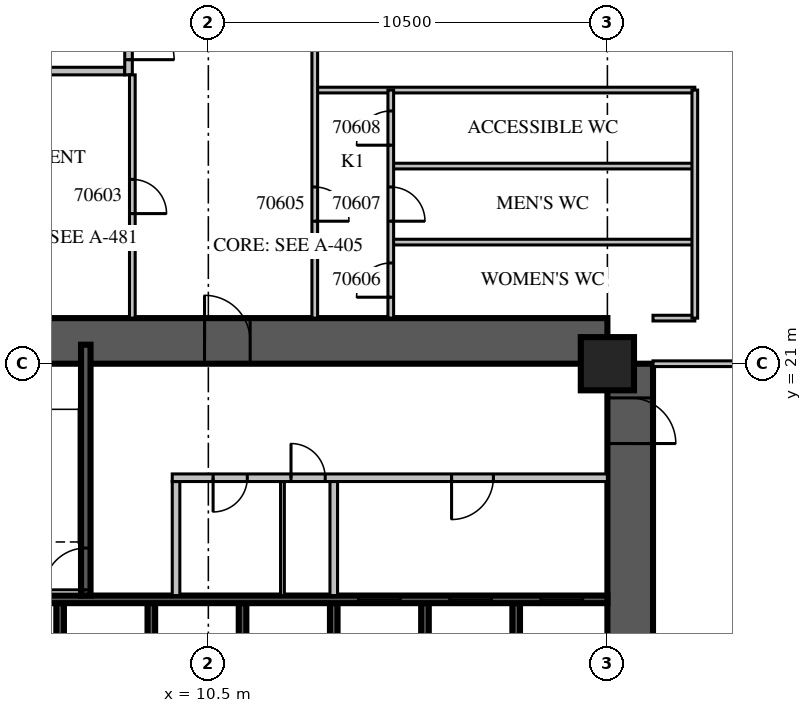
"""IFC4 building model, lengths in metres.
Left out: names, types, materials, properties, quantities, classifications, styles, units other than length and angle.
Written with IfcOpenShell. Run it as: python <this file> out.ifc"""

import sys

from ifc_helpers import new_model, si_unit, direction, frame, frame_2d, origin, origin_2d, place, context, subcontext, project, spatial, rectangle, extrude, source, transform, mapped, element, fill, save


model = new_model("IFC4")
c1 = context("Model", 3, precision=1e-05, world=origin(), true_north=direction((0.0, 1.0)))
c2 = subcontext(c1, "Body", "Model", "MODEL_VIEW")
j1 = project(units=[si_unit("LENGTHUNIT", "METRE"), si_unit("PLANEANGLEUNIT", "RADIAN")], contexts=[c1])
p1 = place(None, origin())
s1 = spatial("IfcSite", under=j1, at=p1, CompositionType="ELEMENT")
p2 = place(p1, origin())
s2 = spatial("IfcBuilding", under=s1, at=p2, CompositionType="ELEMENT")
p3 = place(p2, frame((0.0, 0.0, 18.3)))
s3 = spatial("IfcBuildingStorey", under=s2, at=p3, CompositionType="ELEMENT", Elevation=18.3)
m1 = source(origin(), c2, "Body", "SweptSolid", [
    extrude(rectangle(XDim=1.4, YDim=1.4, at=origin_2d()), origin(), (0.0, 0.0, 1.0), 5.4),
])
p4 = place(p3, frame((21.0, 21.0, 0.0), z_axis=(0.0, 0.0, 1.0), x_axis=(1.0, 0.0, 0.0)))
e1 = element("IfcColumn", 1, at=p4, inside=s3, PredefinedType="COLUMN", context=c2, shape_type="MappedRepresentation", body=[
    mapped(m1, transform((0.0, 0.0, 0.0), scale=1.0)),
])
m2 = source(origin(), c2, "Body", "SweptSolid", [
    extrude(rectangle(XDim=16.8, YDim=1.2, at=frame_2d((8.4, 0.0))), origin(), (0.0, 0.0, 1.0), 5.4),
])
p5 = place(p3, frame((21.6, 4.2, 0.0), z_axis=(0.0, 0.0, 1.0), x_axis=(0.0, 1.0, 0.0)))
e2 = element("IfcWall", 2, at=p5, inside=s3, PredefinedType="SHEAR", context=c2, shape_type="MappedRepresentation", body=[
    mapped(m2, transform((0.0, 0.0, 0.0), scale=1.0)),
])
m3 = source(origin(), c2, "Body", "SweptSolid", [
    extrude(rectangle(XDim=2.2, YDim=2.1, at=frame_2d((1.1, 1.05))), frame((0.0, 0.61, 0.0), z_axis=(0.0, -1.0, 0.0), x_axis=(1.0, 0.0, 0.0)), (0.0, 0.0, 1.0), 1.22),
])
p6 = place(p5, frame((4.2, 0.0, 0.0)))
e3 = element("IfcOpeningElement", 3, at=p6, cuts=e2, PredefinedType="OPENING", context=c2, shape_type="MappedRepresentation", body=[
    mapped(m3, transform((0.0, 0.0, 0.0), scale=1.0)),
])
m4 = source(origin(), c2, "Body", "SweptSolid", [
    extrude(rectangle(XDim=1.2, YDim=2.1, at=frame_2d((0.6, 1.05))), frame((0.0, 0.61, 0.0), z_axis=(0.0, -1.0, 0.0), x_axis=(1.0, 0.0, 0.0)), (0.0, 0.0, 1.0), 1.22),
])
p7 = place(p5, frame((14.7, 0.0, 0.0)))
e4 = element("IfcOpeningElement", 4, at=p7, cuts=e2, PredefinedType="OPENING", context=c2, shape_type="MappedRepresentation", body=[
    mapped(m4, transform((0.0, 0.0, 0.0), scale=1.0)),
])
p8 = place(p3, frame((4.2, 21.6, 0.0), z_axis=(0.0, 0.0, 1.0), x_axis=(1.0, 0.0, 0.0)))
e5 = element("IfcWall", 5, at=p8, inside=s3, PredefinedType="SHEAR", context=c2, shape_type="MappedRepresentation", body=[
    mapped(m2, transform((0.0, 0.0, 0.0), scale=1.0)),
])
p9 = place(p8, frame((6.2, 0.0, 0.0)))
e6 = element("IfcOpeningElement", 6, at=p9, cuts=e5, PredefinedType="OPENING", context=c2, shape_type="MappedRepresentation", body=[
    mapped(m4, transform((0.0, 0.0, 0.0), scale=1.0)),
])
m5 = source(origin(), c2, "Body", "SweptSolid", [
    extrude(rectangle(XDim=3.0, YDim=0.2, at=frame_2d((1.5, 0.0))), origin(), (0.0, 0.0, 1.0), 5.4),
])
for number, where, z_axis, x_axis in (
    (7, (6.6, 11.7, 0.0), (0.0, 0.0, 1.0), (0.0, 1.0, 0.0)),
    (8, (9.0, 11.7, 0.0), (0.0, 0.0, 1.0), (0.0, 1.0, 0.0)),
    (9, (11.4, 11.7, 0.0), (0.0, 0.0, 1.0), (0.0, 1.0, 0.0)),
    (10, (13.8, 11.7, 0.0), (0.0, 0.0, 1.0), (0.0, 1.0, 0.0)),
    (11, (16.2, 11.7, 0.0), (0.0, 0.0, 1.0), (0.0, 1.0, 0.0)),
    (12, (18.6, 11.7, 0.0), (0.0, 0.0, 1.0), (0.0, 1.0, 0.0)),
):
    element("IfcWall", number, at=place(p3, frame(where, z_axis=z_axis, x_axis=x_axis)), inside=s3, PredefinedType="SOLIDWALL", context=c2, shape_type="MappedRepresentation", body=[
        mapped(m5, transform((0.0, 0.0, 0.0), scale=1.0)),
    ])
m6 = source(origin(), c2, "Body", "SweptSolid", [
    extrude(rectangle(XDim=16.8, YDim=0.2, at=frame_2d((8.4, 0.0))), origin(), (0.0, 0.0, 1.0), 5.4),
])
p10 = place(p3, frame((4.2, 14.8, 0.0), z_axis=(0.0, 0.0, 1.0), x_axis=(1.0, 0.0, 0.0)))
e13 = element("IfcWall", 13, at=p10, inside=s3, PredefinedType="SOLIDWALL", context=c2, shape_type="MappedRepresentation", body=[
    mapped(m6, transform((0.0, 0.0, 0.0), scale=1.0)),
])
m7 = source(origin(), c2, "Body", "SweptSolid", [
    extrude(rectangle(XDim=1.1, YDim=2.1, at=frame_2d((0.55, 1.05))), frame((0.0, 0.11, 0.0), z_axis=(0.0, -1.0, 0.0), x_axis=(1.0, 0.0, 0.0)), (0.0, 0.0, 1.0), 0.22),
])
p11 = place(p10, frame((10.25, 0.0, 0.0)))
e14 = element("IfcOpeningElement", 14, at=p11, cuts=e13, PredefinedType="OPENING", context=c2, shape_type="MappedRepresentation", body=[
    mapped(m7, transform((0.0, 0.0, 0.0), scale=1.0)),
])
p12 = place(p10, frame((12.65, 0.0, 0.0)))
e15 = element("IfcOpeningElement", 15, at=p12, cuts=e13, PredefinedType="OPENING", context=c2, shape_type="MappedRepresentation", body=[
    mapped(m7, transform((0.0, 0.0, 0.0), scale=1.0)),
])
p13 = place(p10, frame((15.05, 0.0, 0.0)))
e16 = element("IfcOpeningElement", 16, at=p13, cuts=e13, PredefinedType="OPENING", context=c2, shape_type="MappedRepresentation", body=[
    mapped(m7, transform((0.0, 0.0, 0.0), scale=1.0)),
])
m8 = source(origin(), c2, "Body", "SweptSolid", [
    extrude(rectangle(XDim=6.6, YDim=0.25, at=frame_2d((3.3, 0.0))), origin(), (0.0, 0.0, 1.0), 4.8),
])
p14 = place(p3, frame((7.275, 14.9, 0.0), z_axis=(0.0, 0.0, 1.0), x_axis=(0.0, 1.0, 0.0)))
e17 = element("IfcWall", 17, at=p14, inside=s3, PredefinedType="SOLIDWALL", context=c2, shape_type="MappedRepresentation", body=[
    mapped(m8, transform((0.0, 0.0, 0.0), scale=1.0)),
])
m9 = source(origin(), c2, "Body", "SweptSolid", [
    extrude(rectangle(XDim=1.1, YDim=2.1, at=frame_2d((0.55, 1.05))), frame((0.0, 0.135, 0.0), z_axis=(0.0, -1.0, 0.0), x_axis=(1.0, 0.0, 0.0)), (0.0, 0.0, 1.0), 0.27),
])
p15 = place(p14, frame((0.15, 0.0, 0.0)))
e18 = element("IfcOpeningElement", 18, at=p15, cuts=e17, PredefinedType="OPENING", context=c2, shape_type="MappedRepresentation", body=[
    mapped(m9, transform((0.0, 0.0, 0.0), scale=1.0)),
])
m10 = source(origin(), c2, "Body", "SweptSolid", [
    extrude(rectangle(XDim=3.0, YDim=0.2, at=frame_2d((1.5, 0.0))), origin(), (0.0, 0.0, 1.0), 4.8),
])
p16 = place(p3, frame((9.65, 14.9, 0.0), z_axis=(0.0, 0.0, 1.0), x_axis=(0.0, 1.0, 0.0)))
e19 = element("IfcWall", 19, at=p16, inside=s3, PredefinedType="PARTITIONING", context=c2, shape_type="MappedRepresentation", body=[
    mapped(m10, transform((0.0, 0.0, 0.0), scale=1.0)),
])
m11 = source(origin(), c2, "Body", "SweptSolid", [
    extrude(rectangle(XDim=11.45, YDim=0.2, at=frame_2d((5.725, 0.0))), origin(), (0.0, 0.0, 1.0), 4.8),
])
p17 = place(p3, frame((9.55, 18.0, 0.0), z_axis=(0.0, 0.0, 1.0), x_axis=(1.0, 0.0, 0.0)))
e20 = element("IfcWall", 20, at=p17, inside=s3, PredefinedType="PARTITIONING", context=c2, shape_type="MappedRepresentation", body=[
    mapped(m11, transform((0.0, 0.0, 0.0), scale=1.0)),
])
m12 = source(origin(), c2, "Body", "SweptSolid", [
    extrude(rectangle(XDim=0.9, YDim=2.1, at=frame_2d((0.45, 1.05))), frame((0.0, 0.11, 0.0), z_axis=(0.0, -1.0, 0.0), x_axis=(1.0, 0.0, 0.0)), (0.0, 0.0, 1.0), 0.22),
])
p18 = place(p17, frame((1.075, 0.0, 0.0)))
e21 = element("IfcOpeningElement", 21, at=p18, cuts=e20, PredefinedType="OPENING", context=c2, shape_type="MappedRepresentation", body=[
    mapped(m12, transform((0.0, 0.0, 0.0), scale=1.0)),
])
p19 = place(p17, frame((3.125, 0.0, 0.0)))
e22 = element("IfcOpeningElement", 22, at=p19, cuts=e20, PredefinedType="OPENING", context=c2, shape_type="MappedRepresentation", body=[
    mapped(m12, transform((0.0, 0.0, 0.0), scale=1.0)),
])
p20 = place(p17, frame((7.35, 0.0, 0.0)))
e23 = element("IfcOpeningElement", 23, at=p20, cuts=e20, PredefinedType="OPENING", context=c2, shape_type="MappedRepresentation", body=[
    mapped(m7, transform((0.0, 0.0, 0.0), scale=1.0)),
])
p21 = place(p3, frame((13.8, 14.9, 0.0), z_axis=(0.0, 0.0, 1.0), x_axis=(0.0, 1.0, 0.0)))
e24 = element("IfcWall", 24, at=p21, inside=s3, PredefinedType="PARTITIONING", context=c2, shape_type="MappedRepresentation", body=[
    mapped(m10, transform((0.0, 0.0, 0.0), scale=1.0)),
])
m13 = source(origin(), c2, "Body", "SweptSolid", [
    extrude(rectangle(XDim=3.0, YDim=0.1, at=frame_2d((1.5, 0.0))), origin(), (0.0, 0.0, 1.0), 4.8),
])
p22 = place(p3, frame((12.45, 14.9, 0.0), z_axis=(0.0, 0.0, 1.0), x_axis=(0.0, 1.0, 0.0)))
e25 = element("IfcWall", 25, at=p22, inside=s3, PredefinedType="PARTITIONING", context=c2, shape_type="MappedRepresentation", body=[
    mapped(m13, transform((0.0, 0.0, 0.0), scale=1.0)),
])
m14 = source(origin(), c2, "Body", "SweptSolid", [
    extrude(rectangle(XDim=8.0, YDim=0.2, at=frame_2d((4.0, 0.0))), origin(), (0.0, 0.0, 1.0), 4.8),
])
p23 = place(p3, frame((0.3, 28.7, 0.0), z_axis=(0.0, 0.0, 1.0), x_axis=(1.0, 0.0, 0.0)))
e26 = element("IfcWall", 26, at=p23, inside=s3, PredefinedType="PARTITIONING", context=c2, shape_type="MappedRepresentation", body=[
    mapped(m14, transform((0.0, 0.0, 0.0), scale=1.0)),
])
m15 = source(origin(), c2, "Body", "SweptSolid", [
    extrude(rectangle(XDim=5.45, YDim=0.2, at=frame_2d((2.725, 0.0))), origin(), (0.0, 0.0, 1.0), 4.8),
])
p24 = place(p3, frame((8.4, 28.6, 0.0), z_axis=(0.0, 0.0, 1.0), x_axis=(0.0, 1.0, 0.0)))
e27 = element("IfcWall", 27, at=p24, inside=s3, PredefinedType="PARTITIONING", context=c2, shape_type="MappedRepresentation", body=[
    mapped(m15, transform((0.0, 0.0, 0.0), scale=1.0)),
])
m16 = source(origin(), c2, "Body", "SweptSolid", [
    extrude(rectangle(XDim=1.2, YDim=2.1, at=frame_2d((0.6, 1.05))), frame((0.0, 0.11, 0.0), z_axis=(0.0, -1.0, 0.0), x_axis=(1.0, 0.0, 0.0)), (0.0, 0.0, 1.0), 0.22),
])
p25 = place(p24, frame((0.4, 0.0, 0.0)))
e28 = element("IfcOpeningElement", 28, at=p25, cuts=e27, PredefinedType="OPENING", context=c2, shape_type="MappedRepresentation", body=[
    mapped(m16, transform((0.0, 0.0, 0.0), scale=1.0)),
])
p26 = place(p24, frame((3.25, 0.0, 0.0)))
e29 = element("IfcOpeningElement", 29, at=p26, cuts=e27, PredefinedType="OPENING", context=c2, shape_type="MappedRepresentation", body=[
    mapped(m12, transform((0.0, 0.0, 0.0), scale=1.0)),
])
m17 = source(origin(), c2, "Body", "SweptSolid", [
    extrude(rectangle(XDim=16.2, YDim=0.15, at=frame_2d((8.1, 0.0))), origin(), (0.0, 0.0, 1.0), 4.8),
])
p27 = place(p3, frame((22.2, 21.0, 0.0), z_axis=(0.0, 0.0, 1.0), x_axis=(1.0, 0.0, 0.0)))
e30 = element("IfcWall", 30, at=p27, inside=s3, PredefinedType="PARTITIONING", context=c2, shape_type="MappedRepresentation", body=[
    mapped(m17, transform((0.0, 0.0, 0.0), scale=1.0)),
])
m18 = source(origin(), c2, "Body", "SweptSolid", [
    extrude(rectangle(XDim=1.1, YDim=0.15, at=frame_2d((0.55, 0.0))), origin(), (0.0, 0.0, 1.0), 4.8),
])
p28 = place(p3, frame((22.2, 22.2, 0.0), z_axis=(0.0, 0.0, 1.0), x_axis=(1.0, 0.0, 0.0)))
e31 = element("IfcWall", 31, at=p28, inside=s3, PredefinedType="PARTITIONING", context=c2, shape_type="MappedRepresentation", body=[
    mapped(m18, transform((0.0, 0.0, 0.0), scale=1.0)),
])
m19 = source(origin(), c2, "Body", "SweptSolid", [
    extrude(rectangle(XDim=8.0, YDim=0.15, at=frame_2d((4.0, 0.0))), origin(), (0.0, 0.0, 1.0), 4.8),
])
for number, where, z_axis, x_axis in (
    (32, (15.3, 24.2, 0.0), (0.0, 0.0, 1.0), (1.0, 0.0, 0.0)),
    (33, (15.3, 26.2, 0.0), (0.0, 0.0, 1.0), (1.0, 0.0, 0.0)),
):
    element("IfcWall", number, at=place(p3, frame(where, z_axis=z_axis, x_axis=x_axis)), inside=s3, PredefinedType="PARTITIONING", context=c2, shape_type="MappedRepresentation", body=[
        mapped(m19, transform((0.0, 0.0, 0.0), scale=1.0)),
    ])
m20 = source(origin(), c2, "Body", "SweptSolid", [
    extrude(rectangle(XDim=10.0, YDim=0.15, at=frame_2d((5.0, 0.0))), origin(), (0.0, 0.0, 1.0), 4.8),
])
p29 = place(p3, frame((13.3, 28.2, 0.0), z_axis=(0.0, 0.0, 1.0), x_axis=(1.0, 0.0, 0.0)))
e34 = element("IfcWall", 34, at=p29, inside=s3, PredefinedType="PARTITIONING", context=c2, shape_type="MappedRepresentation", body=[
    mapped(m20, transform((0.0, 0.0, 0.0), scale=1.0)),
])
m21 = source(origin(), c2, "Body", "SweptSolid", [
    extrude(rectangle(XDim=6.4, YDim=0.15, at=frame_2d((3.2, 0.0))), origin(), (0.0, 0.0, 1.0), 4.8),
])
p30 = place(p3, frame((8.5, 22.2, 0.0), z_axis=(0.0, 0.0, 1.0), x_axis=(0.0, 1.0, 0.0)))
e35 = element("IfcWall", 35, at=p30, inside=s3, PredefinedType="PARTITIONING", context=c2, shape_type="MappedRepresentation", body=[
    mapped(m21, transform((0.0, 0.0, 0.0), scale=1.0)),
])
m22 = source(origin(), c2, "Body", "SweptSolid", [
    extrude(rectangle(XDim=0.9, YDim=2.1, at=frame_2d((0.45, 1.05))), frame((0.0, 0.085, 0.0), z_axis=(0.0, -1.0, 0.0), x_axis=(1.0, 0.0, 0.0)), (0.0, 0.0, 1.0), 0.17),
])
p31 = place(p30, frame((2.75, 0.0, 0.0)))
e36 = element("IfcOpeningElement", 36, at=p31, cuts=e35, PredefinedType="OPENING", context=c2, shape_type="MappedRepresentation", body=[
    mapped(m22, transform((0.0, 0.0, 0.0), scale=1.0)),
])
m23 = source(origin(), c2, "Body", "SweptSolid", [
    extrude(rectangle(XDim=20.3, YDim=0.15, at=frame_2d((10.15, 0.0))), origin(), (0.0, 0.0, 1.0), 4.8),
])
p32 = place(p3, frame((13.3, 22.2, 0.0), z_axis=(0.0, 0.0, 1.0), x_axis=(0.0, 1.0, 0.0)))
e37 = element("IfcWall", 37, at=p32, inside=s3, PredefinedType="PARTITIONING", context=c2, shape_type="MappedRepresentation", body=[
    mapped(m23, transform((0.0, 0.0, 0.0), scale=1.0)),
])
p33 = place(p32, frame((2.55, 0.0, 0.0)))
e38 = element("IfcOpeningElement", 38, at=p33, cuts=e37, PredefinedType="OPENING", context=c2, shape_type="MappedRepresentation", body=[
    mapped(m22, transform((0.0, 0.0, 0.0), scale=1.0)),
])
m24 = source(origin(), c2, "Body", "SweptSolid", [
    extrude(rectangle(XDim=6.0, YDim=0.15, at=frame_2d((3.0, 0.0))), origin(), (0.0, 0.0, 1.0), 4.8),
])
p34 = place(p3, frame((15.3, 22.2, 0.0), z_axis=(0.0, 0.0, 1.0), x_axis=(0.0, 1.0, 0.0)))
e39 = element("IfcWall", 39, at=p34, inside=s3, PredefinedType="PARTITIONING", context=c2, shape_type="MappedRepresentation", body=[
    mapped(m24, transform((0.0, 0.0, 0.0), scale=1.0)),
])
p35 = place(p34, frame((0.55, 0.0, 0.0)))
e40 = element("IfcOpeningElement", 40, at=p35, cuts=e39, PredefinedType="OPENING", context=c2, shape_type="MappedRepresentation", body=[
    mapped(m22, transform((0.0, 0.0, 0.0), scale=1.0)),
])
p36 = place(p34, frame((2.55, 0.0, 0.0)))
e41 = element("IfcOpeningElement", 41, at=p36, cuts=e39, PredefinedType="OPENING", context=c2, shape_type="MappedRepresentation", body=[
    mapped(m22, transform((0.0, 0.0, 0.0), scale=1.0)),
])
p37 = place(p34, frame((4.55, 0.0, 0.0)))
e42 = element("IfcOpeningElement", 42, at=p37, cuts=e39, PredefinedType="OPENING", context=c2, shape_type="MappedRepresentation", body=[
    mapped(m22, transform((0.0, 0.0, 0.0), scale=1.0)),
])
p38 = place(p3, frame((23.3, 22.2, 0.0), z_axis=(0.0, 0.0, 1.0), x_axis=(0.0, 1.0, 0.0)))
e43 = element("IfcWall", 43, at=p38, inside=s3, PredefinedType="PARTITIONING", context=c2, shape_type="MappedRepresentation", body=[
    mapped(m24, transform((0.0, 0.0, 0.0), scale=1.0)),
])
m25 = source(origin(), c2, "Body", "SweptSolid", [
    extrude(rectangle(XDim=1.1, YDim=2.1, at=frame_2d((0.55, 1.05))), frame((0.0, 0.025, 0.0), z_axis=(0.0, -1.0, 0.0), x_axis=(1.0, 0.0, 0.0)), (0.0, 0.0, 1.0), 0.05),
])
p39 = place(p11, origin())
e44 = element("IfcDoor", 44, at=p39, inside=s3, OperationType="SLIDING_TO_LEFT", PredefinedType="DOOR", context=c2, shape_type="MappedRepresentation", body=[
    mapped(m25, transform((0.0, 0.0, 0.0), scale=1.0)),
])
fill(e14, e44)
p40 = place(p12, origin())
e45 = element("IfcDoor", 45, at=p40, inside=s3, OperationType="SLIDING_TO_LEFT", PredefinedType="DOOR", context=c2, shape_type="MappedRepresentation", body=[
    mapped(m25, transform((0.0, 0.0, 0.0), scale=1.0)),
])
fill(e15, e45)
p41 = place(p13, origin())
e46 = element("IfcDoor", 46, at=p41, inside=s3, OperationType="SLIDING_TO_LEFT", PredefinedType="DOOR", context=c2, shape_type="MappedRepresentation", body=[
    mapped(m25, transform((0.0, 0.0, 0.0), scale=1.0)),
])
fill(e16, e46)
p42 = place(p15, origin())
e47 = element("IfcDoor", 47, at=p42, inside=s3, OperationType="SINGLE_SWING_LEFT", PredefinedType="DOOR", context=c2, shape_type="MappedRepresentation", body=[
    mapped(m25, transform((0.0, 0.0, 0.0), scale=1.0)),
])
fill(e18, e47)
m26 = source(origin(), c2, "Body", "SweptSolid", [
    extrude(rectangle(XDim=0.9, YDim=2.1, at=frame_2d((0.45, 1.05))), frame((0.0, 0.025, 0.0), z_axis=(0.0, -1.0, 0.0), x_axis=(1.0, 0.0, 0.0)), (0.0, 0.0, 1.0), 0.05),
])
p43 = place(p18, origin())
e48 = element("IfcDoor", 48, at=p43, inside=s3, OperationType="SINGLE_SWING_RIGHT", PredefinedType="DOOR", context=c2, shape_type="MappedRepresentation", body=[
    mapped(m26, transform((0.0, 0.0, 0.0), scale=1.0)),
])
fill(e21, e48)
p44 = place(p19, origin())
e49 = element("IfcDoor", 49, at=p44, inside=s3, OperationType="SINGLE_SWING_LEFT", PredefinedType="DOOR", context=c2, shape_type="MappedRepresentation", body=[
    mapped(m26, transform((0.0, 0.0, 0.0), scale=1.0)),
])
fill(e22, e49)
p45 = place(p20, origin())
e50 = element("IfcDoor", 50, at=p45, inside=s3, OperationType="SINGLE_SWING_RIGHT", PredefinedType="DOOR", context=c2, shape_type="MappedRepresentation", body=[
    mapped(m25, transform((0.0, 0.0, 0.0), scale=1.0)),
])
fill(e23, e50)
m27 = source(origin(), c2, "Body", "SweptSolid", [
    extrude(rectangle(XDim=1.2, YDim=2.1, at=frame_2d((0.6, 1.05))), frame((0.0, 0.025, 0.0), z_axis=(0.0, -1.0, 0.0), x_axis=(1.0, 0.0, 0.0)), (0.0, 0.0, 1.0), 0.05),
])
p46 = place(p25, origin())
e51 = element("IfcDoor", 51, at=p46, inside=s3, OperationType="SINGLE_SWING_RIGHT", PredefinedType="DOOR", context=c2, shape_type="MappedRepresentation", body=[
    mapped(m27, transform((0.0, 0.0, 0.0), scale=1.0)),
])
fill(e28, e51)
p47 = place(p9, origin())
e52 = element("IfcDoor", 52, at=p47, inside=s3, OperationType="SINGLE_SWING_LEFT", PredefinedType="DOOR", context=c2, shape_type="MappedRepresentation", body=[
    mapped(m27, transform((0.0, 0.0, 0.0), scale=1.0)),
])
fill(e6, e52)
p48 = place(p7, origin())
e53 = element("IfcDoor", 53, at=p48, inside=s3, OperationType="SINGLE_SWING_RIGHT", PredefinedType="DOOR", context=c2, shape_type="MappedRepresentation", body=[
    mapped(m27, transform((0.0, 0.0, 0.0), scale=1.0)),
])
fill(e4, e53)
p49 = place(p31, origin())
e54 = element("IfcDoor", 54, at=p49, inside=s3, OperationType="SINGLE_SWING_RIGHT", PredefinedType="DOOR", context=c2, shape_type="MappedRepresentation", body=[
    mapped(m26, transform((0.0, 0.0, 0.0), scale=1.0)),
])
fill(e36, e54)
p50 = place(p33, origin())
e55 = element("IfcDoor", 55, at=p50, inside=s3, OperationType="SINGLE_SWING_RIGHT", PredefinedType="DOOR", context=c2, shape_type="MappedRepresentation", body=[
    mapped(m26, transform((0.0, 0.0, 0.0), scale=1.0)),
])
fill(e38, e55)
p51 = place(p35, origin())
e56 = element("IfcDoor", 56, at=p51, inside=s3, OperationType="SINGLE_SWING_LEFT", PredefinedType="DOOR", context=c2, shape_type="MappedRepresentation", body=[
    mapped(m26, transform((0.0, 0.0, 0.0), scale=1.0)),
])
fill(e40, e56)
p52 = place(p36, origin())
e57 = element("IfcDoor", 57, at=p52, inside=s3, OperationType="SINGLE_SWING_RIGHT", PredefinedType="DOOR", context=c2, shape_type="MappedRepresentation", body=[
    mapped(m26, transform((0.0, 0.0, 0.0), scale=1.0)),
])
fill(e41, e57)
p53 = place(p37, origin())
e58 = element("IfcDoor", 58, at=p53, inside=s3, OperationType="SINGLE_SWING_LEFT", PredefinedType="DOOR", context=c2, shape_type="MappedRepresentation", body=[
    mapped(m26, transform((0.0, 0.0, 0.0), scale=1.0)),
])
fill(e42, e58)
save(model, sys.argv[1])
